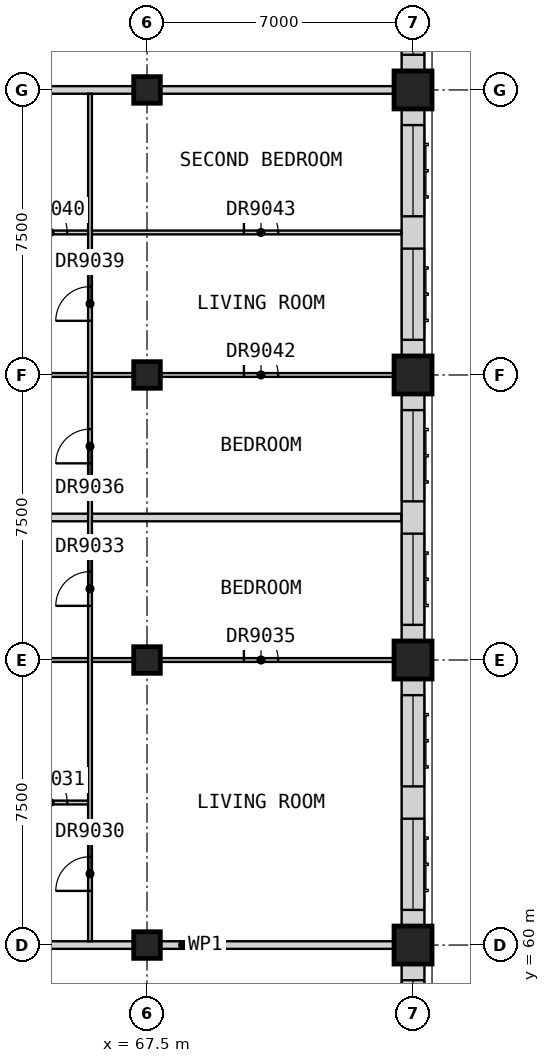
"""IFC4 building model, lengths in metres.
Left out: names, types, materials, properties, quantities, classifications, styles, units other than length and angle.
Written with IfcOpenShell. Run it as: python <this file> out.ifc"""

import sys

from ifc_helpers import new_model, si_unit, direction, frame, frame_2d, origin, origin_2d, place, context, subcontext, project, spatial, rectangle, extrude, element, fill, save


model = new_model("IFC4")
c1 = context("Model", 3, precision=1e-05, world=origin(), true_north=direction((0.0, 1.0)))
c2 = subcontext(c1, "Body", "Model", "MODEL_VIEW")
j1 = project(units=[si_unit("LENGTHUNIT", "METRE"), si_unit("PLANEANGLEUNIT", "RADIAN")], contexts=[c1])
p1 = place(None, origin())
s1 = spatial("IfcSite", under=j1, at=p1, CompositionType="ELEMENT")
p2 = place(p1, origin())
s2 = spatial("IfcBuilding", under=s1, at=p2, CompositionType="ELEMENT")
p3 = place(p2, frame((0.0, 0.0, 280.2)))
s3 = spatial("IfcBuildingStorey", under=s2, at=p3, CompositionType="ELEMENT", Elevation=280.2)
for number, where, z_axis, x_axis in (
    (1, (67.5, 60.0, 0.0), (0.0, 0.0, 1.0), (1.0, 0.0, 0.0)),
    (2, (67.5, 67.5, 0.0), (0.0, 0.0, 1.0), (1.0, 0.0, 0.0)),
    (3, (67.5, 75.0, 0.0), (0.0, 0.0, 1.0), (1.0, 0.0, 0.0)),
    (4, (67.5, 82.5, 0.0), (0.0, 0.0, 1.0), (1.0, 0.0, 0.0)),
):
    element("IfcColumn", number, at=place(p3, frame(where, z_axis=z_axis, x_axis=x_axis)), inside=s3, PredefinedType="COLUMN", context=c2, shape_type="SweptSolid", body=[
        extrude(rectangle(XDim=0.7, YDim=0.7, at=origin_2d()), origin(), (0.0, 0.0, 1.0), 3.5),
    ])
for number, where, z_axis, x_axis in (
    (5, (74.5, 60.0, 0.0), (0.0, 0.0, 1.0), (1.0, 0.0, 0.0)),
    (6, (74.5, 67.5, 0.0), (0.0, 0.0, 1.0), (1.0, 0.0, 0.0)),
    (7, (74.5, 75.0, 0.0), (0.0, 0.0, 1.0), (1.0, 0.0, 0.0)),
    (8, (74.5, 82.5, 0.0), (0.0, 0.0, 1.0), (1.0, 0.0, 0.0)),
):
    element("IfcColumn", number, at=place(p3, frame(where, z_axis=z_axis, x_axis=x_axis)), inside=s3, PredefinedType="COLUMN", context=c2, shape_type="SweptSolid", body=[
        extrude(rectangle(XDim=1.0, YDim=1.0, at=origin_2d()), origin(), (0.0, 0.0, 1.0), 3.5),
    ])
p4 = place(p3, frame((74.5, 53.0, 0.0), z_axis=(0.0, 0.0, 1.0), x_axis=(0.0, 1.0, 0.0)))
e9 = element("IfcWall", 9, at=p4, inside=s3, PredefinedType="SOLIDWALL", context=c2, shape_type="SweptSolid", body=[
    extrude(rectangle(XDim=6.5, YDim=0.6, at=frame_2d((3.25, 0.0))), origin(), (0.0, 0.0, 1.0), 2.75),
])
p5 = place(p4, frame((0.425, 0.0, 0.8)))
e10 = element("IfcOpeningElement", 10, at=p5, cuts=e9, PredefinedType="OPENING", context=c2, shape_type="SweptSolid", body=[
    extrude(rectangle(XDim=2.4, YDim=1.8, at=frame_2d((1.2, 0.9))), frame((0.0, 0.31, 0.0), z_axis=(0.0, -1.0, 0.0), x_axis=(1.0, 0.0, 0.0)), (0.0, 0.0, 1.0), 0.62),
])
p6 = place(p4, frame((3.675, 0.0, 0.8)))
e11 = element("IfcOpeningElement", 11, at=p6, cuts=e9, PredefinedType="OPENING", context=c2, shape_type="SweptSolid", body=[
    extrude(rectangle(XDim=2.4, YDim=1.8, at=frame_2d((1.2, 0.9))), frame((0.0, 0.31, 0.0), z_axis=(0.0, -1.0, 0.0), x_axis=(1.0, 0.0, 0.0)), (0.0, 0.0, 1.0), 0.62),
])
p7 = place(p3, frame((74.5, 60.5, 0.0), z_axis=(0.0, 0.0, 1.0), x_axis=(0.0, 1.0, 0.0)))
e12 = element("IfcWall", 12, at=p7, inside=s3, PredefinedType="SOLIDWALL", context=c2, shape_type="SweptSolid", body=[
    extrude(rectangle(XDim=6.5, YDim=0.6, at=frame_2d((3.25, 0.0))), origin(), (0.0, 0.0, 1.0), 2.75),
])
p8 = place(p7, frame((0.425, 0.0, 0.8)))
e13 = element("IfcOpeningElement", 13, at=p8, cuts=e12, PredefinedType="OPENING", context=c2, shape_type="SweptSolid", body=[
    extrude(rectangle(XDim=2.4, YDim=1.8, at=frame_2d((1.2, 0.9))), frame((0.0, 0.31, 0.0), z_axis=(0.0, -1.0, 0.0), x_axis=(1.0, 0.0, 0.0)), (0.0, 0.0, 1.0), 0.62),
])
p9 = place(p7, frame((3.675, 0.0, 0.8)))
e14 = element("IfcOpeningElement", 14, at=p9, cuts=e12, PredefinedType="OPENING", context=c2, shape_type="SweptSolid", body=[
    extrude(rectangle(XDim=2.4, YDim=1.8, at=frame_2d((1.2, 0.9))), frame((0.0, 0.31, 0.0), z_axis=(0.0, -1.0, 0.0), x_axis=(1.0, 0.0, 0.0)), (0.0, 0.0, 1.0), 0.62),
])
p10 = place(p3, frame((74.5, 68.0, 0.0), z_axis=(0.0, 0.0, 1.0), x_axis=(0.0, 1.0, 0.0)))
e15 = element("IfcWall", 15, at=p10, inside=s3, PredefinedType="SOLIDWALL", context=c2, shape_type="SweptSolid", body=[
    extrude(rectangle(XDim=6.5, YDim=0.6, at=frame_2d((3.25, 0.0))), origin(), (0.0, 0.0, 1.0), 2.75),
])
p11 = place(p10, frame((0.425, 0.0, 0.8)))
e16 = element("IfcOpeningElement", 16, at=p11, cuts=e15, PredefinedType="OPENING", context=c2, shape_type="SweptSolid", body=[
    extrude(rectangle(XDim=2.4, YDim=1.8, at=frame_2d((1.2, 0.9))), frame((0.0, 0.31, 0.0), z_axis=(0.0, -1.0, 0.0), x_axis=(1.0, 0.0, 0.0)), (0.0, 0.0, 1.0), 0.62),
])
p12 = place(p10, frame((3.675, 0.0, 0.8)))
e17 = element("IfcOpeningElement", 17, at=p12, cuts=e15, PredefinedType="OPENING", context=c2, shape_type="SweptSolid", body=[
    extrude(rectangle(XDim=2.4, YDim=1.8, at=frame_2d((1.2, 0.9))), frame((0.0, 0.31, 0.0), z_axis=(0.0, -1.0, 0.0), x_axis=(1.0, 0.0, 0.0)), (0.0, 0.0, 1.0), 0.62),
])
p13 = place(p3, frame((74.5, 75.5, 0.0), z_axis=(0.0, 0.0, 1.0), x_axis=(0.0, 1.0, 0.0)))
e18 = element("IfcWall", 18, at=p13, inside=s3, PredefinedType="SOLIDWALL", context=c2, shape_type="SweptSolid", body=[
    extrude(rectangle(XDim=6.5, YDim=0.6, at=frame_2d((3.25, 0.0))), origin(), (0.0, 0.0, 1.0), 2.75),
])
p14 = place(p13, frame((0.425, 0.0, 0.8)))
e19 = element("IfcOpeningElement", 19, at=p14, cuts=e18, PredefinedType="OPENING", context=c2, shape_type="SweptSolid", body=[
    extrude(rectangle(XDim=2.4, YDim=1.8, at=frame_2d((1.2, 0.9))), frame((0.0, 0.31, 0.0), z_axis=(0.0, -1.0, 0.0), x_axis=(1.0, 0.0, 0.0)), (0.0, 0.0, 1.0), 0.62),
])
p15 = place(p13, frame((3.675, 0.0, 0.8)))
e20 = element("IfcOpeningElement", 20, at=p15, cuts=e18, PredefinedType="OPENING", context=c2, shape_type="SweptSolid", body=[
    extrude(rectangle(XDim=2.4, YDim=1.8, at=frame_2d((1.2, 0.9))), frame((0.0, 0.31, 0.0), z_axis=(0.0, -1.0, 0.0), x_axis=(1.0, 0.0, 0.0)), (0.0, 0.0, 1.0), 0.62),
])
p16 = place(p3, frame((74.5, 83.0, 0.0), z_axis=(0.0, 0.0, 1.0), x_axis=(0.0, 1.0, 0.0)))
e21 = element("IfcWall", 21, at=p16, inside=s3, PredefinedType="SOLIDWALL", context=c2, shape_type="SweptSolid", body=[
    extrude(rectangle(XDim=6.5, YDim=0.6, at=frame_2d((3.25, 0.0))), origin(), (0.0, 0.0, 1.0), 2.75),
])
p17 = place(p16, frame((0.425, 0.0, 0.8)))
e22 = element("IfcOpeningElement", 22, at=p17, cuts=e21, PredefinedType="OPENING", context=c2, shape_type="SweptSolid", body=[
    extrude(rectangle(XDim=2.4, YDim=1.8, at=frame_2d((1.2, 0.9))), frame((0.0, 0.31, 0.0), z_axis=(0.0, -1.0, 0.0), x_axis=(1.0, 0.0, 0.0)), (0.0, 0.0, 1.0), 0.62),
])
p18 = place(p16, frame((3.675, 0.0, 0.8)))
e23 = element("IfcOpeningElement", 23, at=p18, cuts=e21, PredefinedType="OPENING", context=c2, shape_type="SweptSolid", body=[
    extrude(rectangle(XDim=2.4, YDim=1.8, at=frame_2d((1.2, 0.9))), frame((0.0, 0.31, 0.0), z_axis=(0.0, -1.0, 0.0), x_axis=(1.0, 0.0, 0.0)), (0.0, 0.0, 1.0), 0.62),
])
p19 = place(p3, frame((61.875, 60.0, 0.0), z_axis=(0.0, 0.0, 1.0), x_axis=(1.0, 0.0, 0.0)))
e24 = element("IfcWall", 24, at=p19, inside=s3, PredefinedType="PARTITIONING", context=c2, shape_type="SweptSolid", body=[
    extrude(rectangle(XDim=13.125, YDim=0.2, at=frame_2d((6.562, 0.0))), origin(), (0.0, 0.0, 1.0), 3.25),
])
p20 = place(p3, frame((61.875, 71.25, 0.0), z_axis=(0.0, 0.0, 1.0), x_axis=(1.0, 0.0, 0.0)))
e25 = element("IfcWall", 25, at=p20, inside=s3, PredefinedType="PARTITIONING", context=c2, shape_type="SweptSolid", body=[
    extrude(rectangle(XDim=12.315, YDim=0.2, at=frame_2d((6.157, 0.0))), origin(), (0.0, 0.0, 1.0), 3.25),
])
p21 = place(p3, frame((61.875, 82.5, 0.0), z_axis=(0.0, 0.0, 1.0), x_axis=(1.0, 0.0, 0.0)))
e26 = element("IfcWall", 26, at=p21, inside=s3, PredefinedType="PARTITIONING", context=c2, shape_type="SweptSolid", body=[
    extrude(rectangle(XDim=13.125, YDim=0.2, at=frame_2d((6.562, 0.0))), origin(), (0.0, 0.0, 1.0), 3.25),
])
p22 = place(p3, frame((63.962, 63.75, 0.0), z_axis=(0.0, 0.0, 1.0), x_axis=(1.0, 0.0, 0.0)))
e27 = element("IfcWall", 27, at=p22, inside=s3, PredefinedType="PARTITIONING", context=c2, shape_type="SweptSolid", body=[
    extrude(rectangle(XDim=1.988, YDim=0.1, at=frame_2d((0.994, 0.0))), origin(), (0.0, 0.0, 1.0), 3.25),
])
p23 = place(p22, frame((0.538, 0.0, 0.0)))
e28 = element("IfcOpeningElement", 28, at=p23, cuts=e27, PredefinedType="OPENING", context=c2, shape_type="SweptSolid", body=[
    extrude(rectangle(XDim=0.9, YDim=2.1, at=frame_2d((0.45, 1.05))), frame((0.0, 0.06, 0.0), z_axis=(0.0, -1.0, 0.0), x_axis=(1.0, 0.0, 0.0)), (0.0, 0.0, 1.0), 0.12),
])
p24 = place(p3, frame((63.962, 67.5, 0.0), z_axis=(0.0, 0.0, 1.0), x_axis=(1.0, 0.0, 0.0)))
e29 = element("IfcWall", 29, at=p24, inside=s3, PredefinedType="PARTITIONING", context=c2, shape_type="SweptSolid", body=[
    extrude(rectangle(XDim=11.038, YDim=0.1, at=frame_2d((5.519, 0.0))), origin(), (0.0, 0.0, 1.0), 3.25),
])
p25 = place(p24, frame((6.087, 0.0, 0.0)))
e30 = element("IfcOpeningElement", 30, at=p25, cuts=e29, PredefinedType="OPENING", context=c2, shape_type="SweptSolid", body=[
    extrude(rectangle(XDim=0.9, YDim=2.1, at=frame_2d((0.45, 1.05))), frame((0.0, 0.06, 0.0), z_axis=(0.0, -1.0, 0.0), x_axis=(1.0, 0.0, 0.0)), (0.0, 0.0, 1.0), 0.12),
])
p26 = place(p3, frame((63.962, 75.0, 0.0), z_axis=(0.0, 0.0, 1.0), x_axis=(1.0, 0.0, 0.0)))
e31 = element("IfcWall", 31, at=p26, inside=s3, PredefinedType="PARTITIONING", context=c2, shape_type="SweptSolid", body=[
    extrude(rectangle(XDim=11.038, YDim=0.1, at=frame_2d((5.519, 0.0))), origin(), (0.0, 0.0, 1.0), 3.25),
])
p27 = place(p26, frame((6.087, 0.0, 0.0)))
e32 = element("IfcOpeningElement", 32, at=p27, cuts=e31, PredefinedType="OPENING", context=c2, shape_type="SweptSolid", body=[
    extrude(rectangle(XDim=0.9, YDim=2.1, at=frame_2d((0.45, 1.05))), frame((0.0, 0.06, 0.0), z_axis=(0.0, -1.0, 0.0), x_axis=(1.0, 0.0, 0.0)), (0.0, 0.0, 1.0), 0.12),
])
p28 = place(p3, frame((63.962, 78.75, 0.0), z_axis=(0.0, 0.0, 1.0), x_axis=(1.0, 0.0, 0.0)))
e33 = element("IfcWall", 33, at=p28, inside=s3, PredefinedType="PARTITIONING", context=c2, shape_type="SweptSolid", body=[
    extrude(rectangle(XDim=10.228, YDim=0.1, at=frame_2d((5.114, 0.0))), origin(), (0.0, 0.0, 1.0), 3.25),
])
p29 = place(p28, frame((0.538, 0.0, 0.0)))
e34 = element("IfcOpeningElement", 34, at=p29, cuts=e33, PredefinedType="OPENING", context=c2, shape_type="SweptSolid", body=[
    extrude(rectangle(XDim=0.9, YDim=2.1, at=frame_2d((0.45, 1.05))), frame((0.0, 0.06, 0.0), z_axis=(0.0, -1.0, 0.0), x_axis=(1.0, 0.0, 0.0)), (0.0, 0.0, 1.0), 0.12),
])
p30 = place(p28, frame((6.087, 0.0, 0.0)))
e35 = element("IfcOpeningElement", 35, at=p30, cuts=e33, PredefinedType="OPENING", context=c2, shape_type="SweptSolid", body=[
    extrude(rectangle(XDim=0.9, YDim=2.1, at=frame_2d((0.45, 1.05))), frame((0.0, 0.06, 0.0), z_axis=(0.0, -1.0, 0.0), x_axis=(1.0, 0.0, 0.0)), (0.0, 0.0, 1.0), 0.12),
])
p31 = place(p3, frame((66.0, 60.1, 0.0), z_axis=(0.0, 0.0, 1.0), x_axis=(0.0, 1.0, 0.0)))
e36 = element("IfcWall", 36, at=p31, inside=s3, PredefinedType="PARTITIONING", context=c2, shape_type="SweptSolid", body=[
    extrude(rectangle(XDim=22.3, YDim=0.1, at=frame_2d((11.15, 0.0))), origin(), (0.0, 0.0, 1.0), 3.25),
])
p32 = place(p31, frame((1.325, 0.0, 0.0)))
e37 = element("IfcOpeningElement", 37, at=p32, cuts=e36, PredefinedType="OPENING", context=c2, shape_type="SweptSolid", body=[
    extrude(rectangle(XDim=0.9, YDim=2.1, at=frame_2d((0.45, 1.05))), frame((0.0, 0.06, 0.0), z_axis=(0.0, -1.0, 0.0), x_axis=(1.0, 0.0, 0.0)), (0.0, 0.0, 1.0), 0.12),
])
p33 = place(p31, frame((8.825, 0.0, 0.0)))
e38 = element("IfcOpeningElement", 38, at=p33, cuts=e36, PredefinedType="OPENING", context=c2, shape_type="SweptSolid", body=[
    extrude(rectangle(XDim=0.9, YDim=2.1, at=frame_2d((0.45, 1.05))), frame((0.0, 0.06, 0.0), z_axis=(0.0, -1.0, 0.0), x_axis=(1.0, 0.0, 0.0)), (0.0, 0.0, 1.0), 0.12),
])
p34 = place(p31, frame((12.575, 0.0, 0.0)))
e39 = element("IfcOpeningElement", 39, at=p34, cuts=e36, PredefinedType="OPENING", context=c2, shape_type="SweptSolid", body=[
    extrude(rectangle(XDim=0.9, YDim=2.1, at=frame_2d((0.45, 1.05))), frame((0.0, 0.06, 0.0), z_axis=(0.0, -1.0, 0.0), x_axis=(1.0, 0.0, 0.0)), (0.0, 0.0, 1.0), 0.12),
])
p35 = place(p31, frame((16.325, 0.0, 0.0)))
e40 = element("IfcOpeningElement", 40, at=p35, cuts=e36, PredefinedType="OPENING", context=c2, shape_type="SweptSolid", body=[
    extrude(rectangle(XDim=0.9, YDim=2.1, at=frame_2d((0.45, 1.05))), frame((0.0, 0.06, 0.0), z_axis=(0.0, -1.0, 0.0), x_axis=(1.0, 0.0, 0.0)), (0.0, 0.0, 1.0), 0.12),
])
p36 = place(p6, origin())
e41 = element("IfcWindow", 41, at=p36, inside=s3, PartitioningType="SINGLE_PANEL", PredefinedType="WINDOW", context=c2, shape_type="SweptSolid", body=[
    extrude(rectangle(XDim=2.4, YDim=1.8, at=frame_2d((1.2, 0.9))), frame((0.0, -0.07, 0.0), z_axis=(0.0, -1.0, 0.0), x_axis=(1.0, 0.0, 0.0)), (0.0, 0.0, 1.0), 0.06),
])
fill(e11, e41)
p37 = place(p8, origin())
e42 = element("IfcWindow", 42, at=p37, inside=s3, PartitioningType="SINGLE_PANEL", PredefinedType="WINDOW", context=c2, shape_type="SweptSolid", body=[
    extrude(rectangle(XDim=2.4, YDim=1.8, at=frame_2d((1.2, 0.9))), frame((0.0, -0.07, 0.0), z_axis=(0.0, -1.0, 0.0), x_axis=(1.0, 0.0, 0.0)), (0.0, 0.0, 1.0), 0.06),
])
fill(e13, e42)
p38 = place(p9, origin())
e43 = element("IfcWindow", 43, at=p38, inside=s3, PartitioningType="SINGLE_PANEL", PredefinedType="WINDOW", context=c2, shape_type="SweptSolid", body=[
    extrude(rectangle(XDim=2.4, YDim=1.8, at=frame_2d((1.2, 0.9))), frame((0.0, -0.07, 0.0), z_axis=(0.0, -1.0, 0.0), x_axis=(1.0, 0.0, 0.0)), (0.0, 0.0, 1.0), 0.06),
])
fill(e14, e43)
p39 = place(p11, origin())
e44 = element("IfcWindow", 44, at=p39, inside=s3, PartitioningType="SINGLE_PANEL", PredefinedType="WINDOW", context=c2, shape_type="SweptSolid", body=[
    extrude(rectangle(XDim=2.4, YDim=1.8, at=frame_2d((1.2, 0.9))), frame((0.0, -0.07, 0.0), z_axis=(0.0, -1.0, 0.0), x_axis=(1.0, 0.0, 0.0)), (0.0, 0.0, 1.0), 0.06),
])
fill(e16, e44)
p40 = place(p12, origin())
e45 = element("IfcWindow", 45, at=p40, inside=s3, PartitioningType="SINGLE_PANEL", PredefinedType="WINDOW", context=c2, shape_type="SweptSolid", body=[
    extrude(rectangle(XDim=2.4, YDim=1.8, at=frame_2d((1.2, 0.9))), frame((0.0, -0.07, 0.0), z_axis=(0.0, -1.0, 0.0), x_axis=(1.0, 0.0, 0.0)), (0.0, 0.0, 1.0), 0.06),
])
fill(e17, e45)
p41 = place(p14, origin())
e46 = element("IfcWindow", 46, at=p41, inside=s3, PartitioningType="SINGLE_PANEL", PredefinedType="WINDOW", context=c2, shape_type="SweptSolid", body=[
    extrude(rectangle(XDim=2.4, YDim=1.8, at=frame_2d((1.2, 0.9))), frame((0.0, -0.07, 0.0), z_axis=(0.0, -1.0, 0.0), x_axis=(1.0, 0.0, 0.0)), (0.0, 0.0, 1.0), 0.06),
])
fill(e19, e46)
p42 = place(p15, origin())
e47 = element("IfcWindow", 47, at=p42, inside=s3, PartitioningType="SINGLE_PANEL", PredefinedType="WINDOW", context=c2, shape_type="SweptSolid", body=[
    extrude(rectangle(XDim=2.4, YDim=1.8, at=frame_2d((1.2, 0.9))), frame((0.0, -0.07, 0.0), z_axis=(0.0, -1.0, 0.0), x_axis=(1.0, 0.0, 0.0)), (0.0, 0.0, 1.0), 0.06),
])
fill(e20, e47)
p43 = place(p17, origin())
e48 = element("IfcWindow", 48, at=p43, inside=s3, PartitioningType="SINGLE_PANEL", PredefinedType="WINDOW", context=c2, shape_type="SweptSolid", body=[
    extrude(rectangle(XDim=2.4, YDim=1.8, at=frame_2d((1.2, 0.9))), frame((0.0, -0.07, 0.0), z_axis=(0.0, -1.0, 0.0), x_axis=(1.0, 0.0, 0.0)), (0.0, 0.0, 1.0), 0.06),
])
fill(e22, e48)
p44 = place(p32, origin())
e49 = element("IfcDoor", 49, at=p44, inside=s3, OperationType="SINGLE_SWING_LEFT", PredefinedType="DOOR", context=c2, shape_type="SweptSolid", body=[
    extrude(rectangle(XDim=0.9, YDim=2.1, at=frame_2d((0.45, 1.05))), frame((0.0, 0.025, 0.0), z_axis=(0.0, -1.0, 0.0), x_axis=(1.0, 0.0, 0.0)), (0.0, 0.0, 1.0), 0.05),
])
fill(e37, e49)
p45 = place(p23, origin())
e50 = element("IfcDoor", 50, at=p45, inside=s3, OperationType="SINGLE_SWING_RIGHT", PredefinedType="DOOR", context=c2, shape_type="SweptSolid", body=[
    extrude(rectangle(XDim=0.9, YDim=2.1, at=frame_2d((0.45, 1.05))), frame((0.0, 0.025, 0.0), z_axis=(0.0, -1.0, 0.0), x_axis=(1.0, 0.0, 0.0)), (0.0, 0.0, 1.0), 0.05),
])
fill(e28, e50)
p46 = place(p33, origin())
e51 = element("IfcDoor", 51, at=p46, inside=s3, OperationType="SINGLE_SWING_LEFT", PredefinedType="DOOR", context=c2, shape_type="SweptSolid", body=[
    extrude(rectangle(XDim=0.9, YDim=2.1, at=frame_2d((0.45, 1.05))), frame((0.0, 0.025, 0.0), z_axis=(0.0, -1.0, 0.0), x_axis=(1.0, 0.0, 0.0)), (0.0, 0.0, 1.0), 0.05),
])
fill(e38, e51)
p47 = place(p25, origin())
e52 = element("IfcDoor", 52, at=p47, inside=s3, OperationType="SINGLE_SWING_RIGHT", PredefinedType="DOOR", context=c2, shape_type="SweptSolid", body=[
    extrude(rectangle(XDim=0.9, YDim=2.1, at=frame_2d((0.45, 1.05))), frame((0.0, 0.025, 0.0), z_axis=(0.0, -1.0, 0.0), x_axis=(1.0, 0.0, 0.0)), (0.0, 0.0, 1.0), 0.05),
])
fill(e30, e52)
p48 = place(p34, origin())
e53 = element("IfcDoor", 53, at=p48, inside=s3, OperationType="SINGLE_SWING_LEFT", PredefinedType="DOOR", context=c2, shape_type="SweptSolid", body=[
    extrude(rectangle(XDim=0.9, YDim=2.1, at=frame_2d((0.45, 1.05))), frame((0.0, 0.025, 0.0), z_axis=(0.0, -1.0, 0.0), x_axis=(1.0, 0.0, 0.0)), (0.0, 0.0, 1.0), 0.05),
])
fill(e39, e53)
p49 = place(p35, origin())
e54 = element("IfcDoor", 54, at=p49, inside=s3, OperationType="SINGLE_SWING_LEFT", PredefinedType="DOOR", context=c2, shape_type="SweptSolid", body=[
    extrude(rectangle(XDim=0.9, YDim=2.1, at=frame_2d((0.45, 1.05))), frame((0.0, 0.025, 0.0), z_axis=(0.0, -1.0, 0.0), x_axis=(1.0, 0.0, 0.0)), (0.0, 0.0, 1.0), 0.05),
])
fill(e40, e54)
p50 = place(p29, origin())
e55 = element("IfcDoor", 55, at=p50, inside=s3, OperationType="SINGLE_SWING_RIGHT", PredefinedType="DOOR", context=c2, shape_type="SweptSolid", body=[
    extrude(rectangle(XDim=0.9, YDim=2.1, at=frame_2d((0.45, 1.05))), frame((0.0, 0.025, 0.0), z_axis=(0.0, -1.0, 0.0), x_axis=(1.0, 0.0, 0.0)), (0.0, 0.0, 1.0), 0.05),
])
fill(e34, e55)
p51 = place(p27, origin())
e56 = element("IfcDoor", 56, at=p51, inside=s3, OperationType="SINGLE_SWING_RIGHT", PredefinedType="DOOR", context=c2, shape_type="SweptSolid", body=[
    extrude(rectangle(XDim=0.9, YDim=2.1, at=frame_2d((0.45, 1.05))), frame((0.0, 0.025, 0.0), z_axis=(0.0, -1.0, 0.0), x_axis=(1.0, 0.0, 0.0)), (0.0, 0.0, 1.0), 0.05),
])
fill(e32, e56)
p52 = place(p30, origin())
e57 = element("IfcDoor", 57, at=p52, inside=s3, OperationType="SINGLE_SWING_RIGHT", PredefinedType="DOOR", context=c2, shape_type="SweptSolid", body=[
    extrude(rectangle(XDim=0.9, YDim=2.1, at=frame_2d((0.45, 1.05))), frame((0.0, 0.025, 0.0), z_axis=(0.0, -1.0, 0.0), x_axis=(1.0, 0.0, 0.0)), (0.0, 0.0, 1.0), 0.05),
])
fill(e35, e57)
save(model, sys.argv[1])
